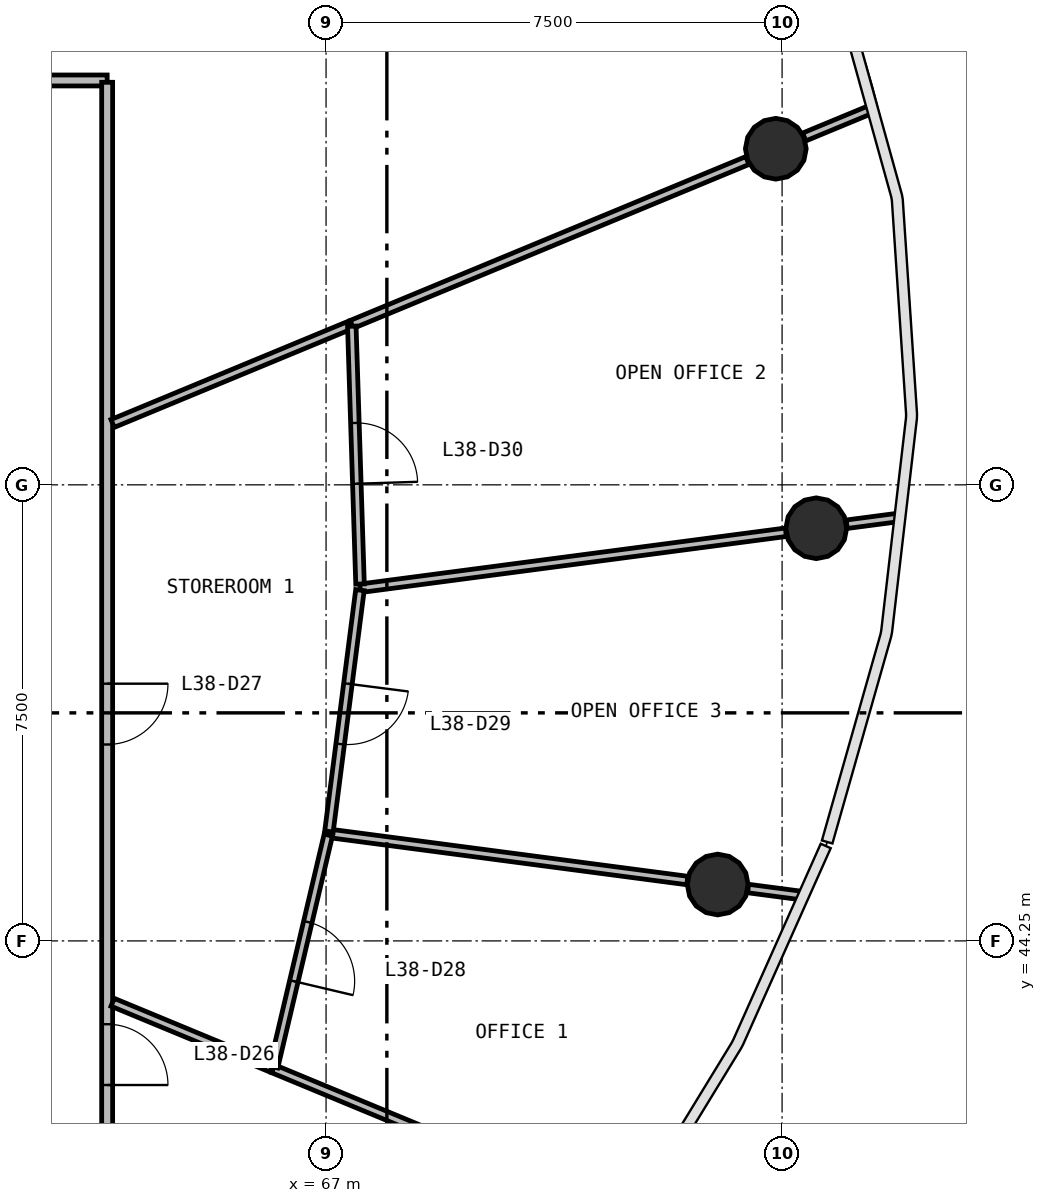
"""IFC4 building model, lengths in metres.
Left out: names, types, materials, properties, quantities, classifications, styles, units other than length and angle.
Written with IfcOpenShell. Run it as: python <this file> out.ifc"""

import sys

from ifc_helpers import new_model, si_unit, direction, frame, frame_2d, origin, origin_2d, place, context, subcontext, project, spatial, rectangle, circle, extrude, source, transform, mapped, element, fill, save


model = new_model("IFC4")
c1 = context("Model", 3, precision=1e-05, world=origin(), true_north=direction((0.0, 1.0)))
c2 = subcontext(c1, "Body", "Model", "MODEL_VIEW")
j1 = project(units=[si_unit("LENGTHUNIT", "METRE"), si_unit("PLANEANGLEUNIT", "RADIAN")], contexts=[c1])
p1 = place(None, origin())
s1 = spatial("IfcSite", under=j1, at=p1, CompositionType="ELEMENT")
p2 = place(p1, origin())
s2 = spatial("IfcBuilding", under=s1, at=p2, CompositionType="ELEMENT")
p3 = place(p2, frame((0.0, 0.0, 160.4)))
s3 = spatial("IfcBuildingStorey", under=s2, at=p3, CompositionType="ELEMENT", Elevation=160.4)
m1 = source(origin(), c2, "Body", "SweptSolid", [
    extrude(circle(Radius=0.5, at=origin_2d()), origin(), (0.0, 0.0, 1.0), 3.9),
])
for number, where, z_axis, x_axis in (
    (1, (75.062, 51.036, 0.0), (0.0, 0.0, 1.0), (1.0, 0.0, 0.0)),
    (2, (74.397, 57.277, 0.0), (0.0, 0.0, 1.0), (1.0, 0.0, 0.0)),
    (3, (73.441, 45.177, 0.0), (0.0, 0.0, 1.0), (1.0, 0.0, 0.0)),
):
    element("IfcColumn", number, at=place(p3, frame(where, z_axis=z_axis, x_axis=x_axis)), inside=s3, PredefinedType="COLUMN", context=c2, shape_type="MappedRepresentation", body=[
        mapped(m1, transform((0.0, 0.0, 0.0), scale=1.0)),
    ])
p4 = place(p3, frame((40.6, 58.4, 0.0), z_axis=(0.0, 0.0, 1.0), x_axis=(1.0, 0.0, 0.0)))
e4 = element("IfcWall", 4, at=p4, inside=s3, PredefinedType="PARTITIONING", context=c2, shape_type="SweptSolid", body=[
    extrude(rectangle(XDim=22.8, YDim=0.18, at=frame_2d((11.4, 0.0))), origin(), (0.0, 0.0, 1.0), 2.88),
])
p5 = place(p4, frame((12.95, 0.0, 0.0)))
e5 = element("IfcOpeningElement", 5, at=p5, cuts=e4, PredefinedType="OPENING", context=c2, shape_type="SweptSolid", body=[
    extrude(rectangle(XDim=1.0, YDim=2.1, at=frame_2d((0.5, 1.05))), frame((0.0, 0.1, 0.0), z_axis=(0.0, -1.0, 0.0), x_axis=(1.0, 0.0, 0.0)), (0.0, 0.0, 1.0), 0.2),
])
p6 = place(p4, frame((10.95, 0.0, 0.0)))
e6 = element("IfcOpeningElement", 6, at=p6, cuts=e4, PredefinedType="OPENING", context=c2, shape_type="SweptSolid", body=[
    extrude(rectangle(XDim=1.0, YDim=2.1, at=frame_2d((0.5, 1.05))), frame((0.0, 0.1, 0.0), z_axis=(0.0, -1.0, 0.0), x_axis=(1.0, 0.0, 0.0)), (0.0, 0.0, 1.0), 0.2),
])
p7 = place(p3, frame((63.4, 58.37, 0.0), z_axis=(0.0, 0.0, 1.0), x_axis=(0.0, -1.0, 0.0)))
e7 = element("IfcWall", 7, at=p7, inside=s3, PredefinedType="PARTITIONING", context=c2, shape_type="SweptSolid", body=[
    extrude(rectangle(XDim=20.74, YDim=0.18, at=frame_2d((10.37, 0.0))), origin(), (0.0, 0.0, 1.0), 2.88),
])
p8 = place(p7, frame((15.49, 0.0, 0.0)))
e8 = element("IfcOpeningElement", 8, at=p8, cuts=e7, PredefinedType="OPENING", context=c2, shape_type="SweptSolid", body=[
    extrude(rectangle(XDim=1.0, YDim=2.1, at=frame_2d((0.5, 1.05))), frame((0.0, 0.1, 0.0), z_axis=(0.0, -1.0, 0.0), x_axis=(1.0, 0.0, 0.0)), (0.0, 0.0, 1.0), 0.2),
])
p9 = place(p7, frame((9.89, 0.0, 0.0)))
e9 = element("IfcOpeningElement", 9, at=p9, cuts=e7, PredefinedType="OPENING", context=c2, shape_type="SweptSolid", body=[
    extrude(rectangle(XDim=1.0, YDim=2.1, at=frame_2d((0.5, 1.05))), frame((0.0, 0.1, 0.0), z_axis=(0.0, -1.0, 0.0), x_axis=(1.0, 0.0, 0.0)), (0.0, 0.0, 1.0), 0.2),
])
p10 = place(p3, frame((67.561, 50.049, 0.0), z_axis=(0.0, 0.0, 1.0), x_axis=(0.991446056041, 0.130517117504, 0.0)))
e10 = element("IfcWall", 10, at=p10, inside=s3, PredefinedType="PARTITIONING", context=c2, shape_type="SweptSolid", body=[
    extrude(rectangle(XDim=7.061, YDim=0.14, at=frame_2d((3.531, 0.0))), origin(), (0.0, 0.0, 1.0), 2.88),
])
p11 = place(p3, frame((67.423, 54.388, 0.0), z_axis=(0.0, 0.0, 1.0), x_axis=(0.923877847589, 0.382687500102, 0.0)))
e11 = element("IfcWall", 11, at=p11, inside=s3, PredefinedType="PARTITIONING", context=c2, shape_type="SweptSolid", body=[
    extrude(rectangle(XDim=7.044, YDim=0.14, at=frame_2d((3.522, 0.0))), origin(), (0.0, 0.0, 1.0), 2.88),
])
p12 = place(p3, frame((67.044, 46.019, 0.0), z_axis=(0.0, 0.0, 1.0), x_axis=(0.991450523091, -0.13048318, 0.0)))
e12 = element("IfcWall", 12, at=p12, inside=s3, PredefinedType="PARTITIONING", context=c2, shape_type="SweptSolid", body=[
    extrude(rectangle(XDim=5.948, YDim=0.14, at=frame_2d((2.974, 0.0))), origin(), (0.0, 0.0, 1.0), 2.88),
])
p13 = place(p3, frame((66.131, 42.147, 0.0), z_axis=(0.0, 0.0, 1.0), x_axis=(0.923872072557, -0.382701441792, 0.0)))
e13 = element("IfcWall", 13, at=p13, inside=s3, PredefinedType="PARTITIONING", context=c2, shape_type="SweptSolid", body=[
    extrude(rectangle(XDim=4.44, YDim=0.14, at=frame_2d((2.22, 0.0))), origin(), (0.0, 0.0, 1.0), 2.88),
])
p14 = place(p3, frame((63.49, 52.759, 0.0), z_axis=(0.0, 0.0, 1.0), x_axis=(0.923878137975, 0.382686799055, 0.0)))
e14 = element("IfcWall", 14, at=p14, inside=s3, PredefinedType="PARTITIONING", context=c2, shape_type="SweptSolid", body=[
    extrude(rectangle(XDim=4.227, YDim=0.14, at=frame_2d((2.113, 0.0))), origin(), (0.0, 0.0, 1.0), 2.88),
])
p15 = place(p3, frame((67.424, 54.358, 0.0), z_axis=(0.0, 0.0, 1.0), x_axis=(0.031887030208, -0.999491479356, 0.0)))
e15 = element("IfcWall", 15, at=p15, inside=s3, PredefinedType="PARTITIONING", context=c2, shape_type="SweptSolid", body=[
    extrude(rectangle(XDim=4.242, YDim=0.14, at=frame_2d((2.121, 0.0))), origin(), (0.0, 0.0, 1.0), 2.88),
])
p16 = place(p15, frame((1.592, 0.0, 0.0)))
e16 = element("IfcOpeningElement", 16, at=p16, cuts=e15, PredefinedType="OPENING", context=c2, shape_type="SweptSolid", body=[
    extrude(rectangle(XDim=1.0, YDim=2.1, at=frame_2d((0.5, 1.05))), frame((0.0, 0.08, 0.0), z_axis=(0.0, -1.0, 0.0), x_axis=(1.0, 0.0, 0.0)), (0.0, 0.0, 1.0), 0.16),
])
p17 = place(p3, frame((67.557, 50.019, 0.0), z_axis=(0.0, 0.0, 1.0), x_axis=(-0.127375141881, -0.99185461295, 0.0)))
e17 = element("IfcWall", 17, at=p17, inside=s3, PredefinedType="PARTITIONING", context=c2, shape_type="SweptSolid", body=[
    extrude(rectangle(XDim=4.002, YDim=0.14, at=frame_2d((2.001, 0.0))), origin(), (0.0, 0.0, 1.0), 2.88),
])
p18 = place(p17, frame((1.552, 0.0, 0.0)))
e18 = element("IfcOpeningElement", 18, at=p18, cuts=e17, PredefinedType="OPENING", context=c2, shape_type="SweptSolid", body=[
    extrude(rectangle(XDim=1.0, YDim=2.1, at=frame_2d((0.5, 1.05))), frame((0.0, 0.08, 0.0), z_axis=(0.0, -1.0, 0.0), x_axis=(1.0, 0.0, 0.0)), (0.0, 0.0, 1.0), 0.16),
])
p19 = place(p3, frame((67.037, 45.99, 0.0), z_axis=(0.0, 0.0, 1.0), x_axis=(-0.229452538662, -0.973319851077, 0.0)))
e19 = element("IfcWall", 19, at=p19, inside=s3, PredefinedType="PARTITIONING", context=c2, shape_type="SweptSolid", body=[
    extrude(rectangle(XDim=3.919, YDim=0.14, at=frame_2d((1.959, 0.0))), origin(), (0.0, 0.0, 1.0), 2.88),
])
p20 = place(p19, frame((1.469, 0.0, 0.0)))
e20 = element("IfcOpeningElement", 20, at=p20, cuts=e19, PredefinedType="OPENING", context=c2, shape_type="SweptSolid", body=[
    extrude(rectangle(XDim=1.0, YDim=2.1, at=frame_2d((0.5, 1.05))), frame((0.0, 0.08, 0.0), z_axis=(0.0, -1.0, 0.0), x_axis=(1.0, 0.0, 0.0)), (0.0, 0.0, 1.0), 0.16),
])
p21 = place(p3, frame((63.49, 43.241, 0.0), z_axis=(0.0, 0.0, 1.0), x_axis=(0.923859015747, -0.382732960462, 0.0)))
e21 = element("IfcWall", 21, at=p21, inside=s3, PredefinedType="PARTITIONING", context=c2, shape_type="SweptSolid", body=[
    extrude(rectangle(XDim=2.828, YDim=0.14, at=frame_2d((1.414, 0.0))), origin(), (0.0, 0.0, 1.0), 2.88),
])
p22 = place(p3, frame((74.863, 57.47, 0.0), z_axis=(0.0, 0.0, 1.0), x_axis=(0.923882723383, 0.382675728829, 0.0)))
e22 = element("IfcWall", 22, at=p22, inside=s3, PredefinedType="PARTITIONING", context=c2, shape_type="SweptSolid", body=[
    extrude(rectangle(XDim=1.198, YDim=0.14, at=frame_2d((0.599, 0.0))), origin(), (0.0, 0.0, 1.0), 2.88),
])
p23 = place(p3, frame((73.941, 45.111, 0.0), z_axis=(0.0, 0.0, 1.0), x_axis=(0.991446500326, -0.130513742537, 0.0)))
e23 = element("IfcWall", 23, at=p23, inside=s3, PredefinedType="PARTITIONING", context=c2, shape_type="SweptSolid", body=[
    extrude(rectangle(XDim=0.853, YDim=0.14, at=frame_2d((0.427, 0.0))), origin(), (0.0, 0.0, 1.0), 2.88),
])
p24 = place(p3, frame((75.562, 51.102, 0.0), z_axis=(0.0, 0.0, 1.0), x_axis=(0.991432738393, 0.130618242377, 0.0)))
e24 = element("IfcWall", 24, at=p24, inside=s3, PredefinedType="PARTITIONING", context=c2, shape_type="SweptSolid", body=[
    extrude(rectangle(XDim=0.849, YDim=0.14, at=frame_2d((0.424, 0.0))), origin(), (0.0, 0.0, 1.0), 2.88),
])
m2 = source(origin(), c2, "Body", "SweptSolid", [
    extrude(rectangle(XDim=1.0, YDim=2.1, at=frame_2d((0.5, 1.05))), frame((0.0, 0.025, 0.0), z_axis=(0.0, -1.0, 0.0), x_axis=(1.0, 0.0, 0.0)), (0.0, 0.0, 1.0), 0.05),
])
p25 = place(p8, origin())
e25 = element("IfcDoor", 25, at=p25, inside=s3, OperationType="SINGLE_SWING_RIGHT", PredefinedType="DOOR", context=c2, shape_type="MappedRepresentation", body=[
    mapped(m2, transform((0.0, 0.0, 0.0), scale=1.0)),
])
fill(e8, e25)
p26 = place(p9, origin())
e26 = element("IfcDoor", 26, at=p26, inside=s3, OperationType="SINGLE_SWING_LEFT", PredefinedType="DOOR", context=c2, shape_type="MappedRepresentation", body=[
    mapped(m2, transform((0.0, 0.0, 0.0), scale=1.0)),
])
fill(e9, e26)
p27 = place(p20, origin())
e27 = element("IfcDoor", 27, at=p27, inside=s3, OperationType="SINGLE_SWING_RIGHT", PredefinedType="DOOR", context=c2, shape_type="MappedRepresentation", body=[
    mapped(m2, transform((0.0, 0.0, 0.0), scale=1.0)),
])
fill(e20, e27)
p28 = place(p18, origin())
e28 = element("IfcDoor", 28, at=p28, inside=s3, OperationType="SINGLE_SWING_LEFT", PredefinedType="DOOR", context=c2, shape_type="MappedRepresentation", body=[
    mapped(m2, transform((0.0, 0.0, 0.0), scale=1.0)),
])
fill(e18, e28)
p29 = place(p16, origin())
e29 = element("IfcDoor", 29, at=p29, inside=s3, OperationType="SINGLE_SWING_RIGHT", PredefinedType="DOOR", context=c2, shape_type="MappedRepresentation", body=[
    mapped(m2, transform((0.0, 0.0, 0.0), scale=1.0)),
])
fill(e16, e29)
save(model, sys.argv[1])
